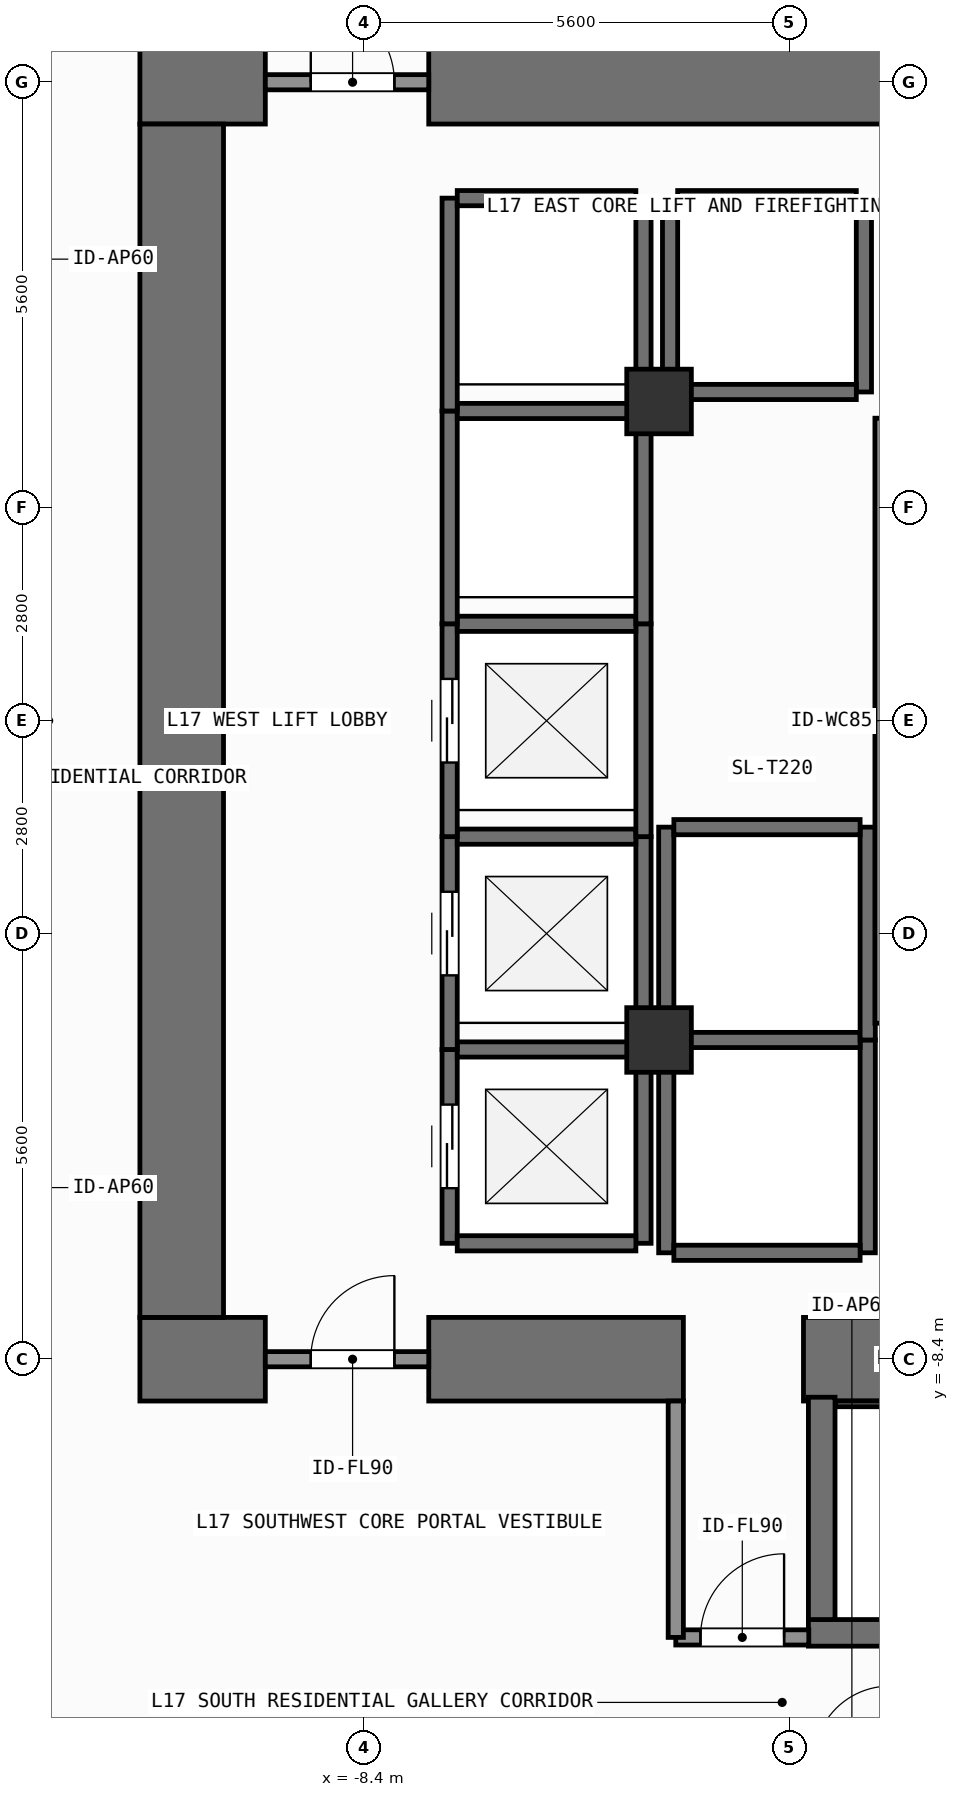
"""IFC4 building model, lengths in metres.
Left out: names, types, materials, properties, quantities, classifications, styles, units other than length and angle.
Written with IfcOpenShell. Run it as: python <this file> out.ifc"""

import sys

from ifc_helpers import new_model, si_unit, direction, frame, frame_2d, origin, origin_2d, place, context, subcontext, project, spatial, rectangle, extrude, element, fill, save


model = new_model("IFC4")
c1 = context("Model", 3, precision=1e-05, world=origin(), true_north=direction((0.0, 1.0)))
c2 = subcontext(c1, "Body", "Model", "MODEL_VIEW")
j1 = project(units=[si_unit("LENGTHUNIT", "METRE"), si_unit("PLANEANGLEUNIT", "RADIAN")], contexts=[c1])
p1 = place(None, origin())
s1 = spatial("IfcSite", under=j1, at=p1, CompositionType="ELEMENT")
p2 = place(p1, origin())
s2 = spatial("IfcBuilding", under=s1, at=p2, CompositionType="ELEMENT")
p3 = place(p2, frame((0.0, 0.0, 65.7)))
s3 = spatial("IfcBuildingStorey", under=s2, at=p3, CompositionType="ELEMENT", Elevation=65.7)
p4 = place(p3, frame((-11.35, -8.4, 0.0), z_axis=(0.0, 0.0, 1.0), x_axis=(1.0, 0.0, 0.0)))
e1 = element("IfcWall", 1, at=p4, inside=s3, PredefinedType="SHEAR", context=c2, shape_type="SweptSolid", body=[
    extrude(rectangle(XDim=1.65, YDim=1.1, at=frame_2d((0.825, 0.0))), origin(), (0.0, 0.0, 1.0), 3.9),
])
p5 = place(p3, frame((-7.55, -8.4, 0.0), z_axis=(0.0, 0.0, 1.0), x_axis=(1.0, 0.0, 0.0)))
e2 = element("IfcWall", 2, at=p5, inside=s3, PredefinedType="SHEAR", context=c2, shape_type="SweptSolid", body=[
    extrude(rectangle(XDim=3.35, YDim=1.1, at=frame_2d((1.675, 0.0))), origin(), (0.0, 0.0, 1.0), 3.9),
])
p6 = place(p3, frame((-2.62, -8.4, 0.0), z_axis=(0.0, 0.0, 1.0), x_axis=(1.0, 0.0, 0.0)))
e3 = element("IfcWall", 3, at=p6, inside=s3, PredefinedType="SHEAR", context=c2, shape_type="SweptSolid", body=[
    extrude(rectangle(XDim=7.27, YDim=1.1, at=frame_2d((3.635, 0.0))), origin(), (0.0, 0.0, 1.0), 3.9),
])
p7 = place(p3, frame((-11.35, 8.4, 0.0), z_axis=(0.0, 0.0, 1.0), x_axis=(1.0, 0.0, 0.0)))
e4 = element("IfcWall", 4, at=p7, inside=s3, PredefinedType="SHEAR", context=c2, shape_type="SweptSolid", body=[
    extrude(rectangle(XDim=1.65, YDim=1.1, at=frame_2d((0.825, 0.0))), origin(), (0.0, 0.0, 1.0), 3.9),
])
p8 = place(p3, frame((-7.55, 8.4, 0.0), z_axis=(0.0, 0.0, 1.0), x_axis=(1.0, 0.0, 0.0)))
e5 = element("IfcWall", 5, at=p8, inside=s3, PredefinedType="SHEAR", context=c2, shape_type="SweptSolid", body=[
    extrude(rectangle(XDim=16.5, YDim=1.1, at=frame_2d((8.25, 0.0))), origin(), (0.0, 0.0, 1.0), 3.9),
])
p9 = place(p3, frame((-10.8, -7.85, 0.0), z_axis=(0.0, 0.0, 1.0), x_axis=(0.0, 1.0, 0.0)))
e6 = element("IfcWall", 6, at=p9, inside=s3, PredefinedType="SHEAR", context=c2, shape_type="SweptSolid", body=[
    extrude(rectangle(XDim=15.7, YDim=1.1, at=frame_2d((7.85, 0.0))), origin(), (0.0, 0.0, 1.0), 3.9),
])
p10 = place(p3, frame((-2.555, -12.0, 0.0), z_axis=(0.0, 0.0, 1.0), x_axis=(1.0, 0.0, 0.0)))
e7 = element("IfcWall", 7, at=p10, inside=s3, PredefinedType="SHEAR", context=c2, shape_type="SweptSolid", body=[
    extrude(rectangle(XDim=7.31, YDim=0.35, at=frame_2d((3.655, 0.0))), origin(), (0.0, 0.0, 1.0), 3.9),
])
p11 = place(p3, frame((-2.2, -8.988, 0.0), z_axis=(0.0, 0.0, 1.0), x_axis=(1.0, 0.0, 0.0)))
e8 = element("IfcWall", 8, at=p11, inside=s3, PredefinedType="SHEAR", context=c2, shape_type="SweptSolid", body=[
    extrude(rectangle(XDim=6.6, YDim=0.075, at=frame_2d((3.3, 0.0))), origin(), (0.0, 0.0, 1.0), 3.9),
])
p12 = place(p3, frame((-2.38, -11.825, 0.0), z_axis=(0.0, 0.0, 1.0), x_axis=(0.0, 1.0, 0.0)))
e9 = element("IfcWall", 9, at=p12, inside=s3, PredefinedType="SHEAR", context=c2, shape_type="SweptSolid", body=[
    extrude(rectangle(XDim=2.925, YDim=0.35, at=frame_2d((1.462, 0.0))), origin(), (0.0, 0.0, 1.0), 3.9),
])
for number, where, z_axis, x_axis in (
    (10, (-4.52, -4.2, 0.0), (0.0, 0.0, 1.0), (1.0, 0.0, 0.0)),
    (11, (-4.52, 4.2, 0.0), (0.0, 0.0, 1.0), (1.0, 0.0, 0.0)),
):
    element("IfcColumn", number, at=place(p3, frame(where, z_axis=z_axis, x_axis=x_axis)), inside=s3, PredefinedType="COLUMN", context=c2, shape_type="SweptSolid", body=[
        extrude(rectangle(XDim=0.85, YDim=0.85, at=origin_2d()), origin(), (0.0, 0.0, 1.0), 3.9),
    ])
p13 = place(p3, frame((-7.275, -6.875, 0.0), z_axis=(0.0, 0.0, 1.0), x_axis=(0.0, 1.0, 0.0)))
e12 = element("IfcWall", 12, at=p13, inside=s3, PredefinedType="SHEAR", context=c2, shape_type="SweptSolid", body=[
    extrude(rectangle(XDim=2.55, YDim=0.2, at=frame_2d((1.275, 0.0))), origin(), (0.0, 0.0, 1.0), 3.68),
])
p14 = place(p13, frame((0.725, 0.0, 0.0)))
e13 = element("IfcOpeningElement", 13, at=p14, cuts=e12, PredefinedType="OPENING", context=c2, shape_type="SweptSolid", body=[
    extrude(rectangle(XDim=1.1, YDim=2.2, at=frame_2d((0.55, 1.1))), frame((0.0, 0.11, 0.0), z_axis=(0.0, -1.0, 0.0), x_axis=(1.0, 0.0, 0.0)), (0.0, 0.0, 1.0), 0.22),
])
p15 = place(p3, frame((-4.725, -6.875, 0.0), z_axis=(0.0, 0.0, 1.0), x_axis=(0.0, 1.0, 0.0)))
e14 = element("IfcWall", 14, at=p15, inside=s3, PredefinedType="SHEAR", context=c2, shape_type="SweptSolid", body=[
    extrude(rectangle(XDim=2.55, YDim=0.2, at=frame_2d((1.275, 0.0))), origin(), (0.0, 0.0, 1.0), 3.68),
])
for number, where, z_axis, x_axis in (
    (15, (-7.175, -6.875, 0.0), (0.0, 0.0, 1.0), (1.0, 0.0, 0.0)),
    (16, (-7.175, -4.325, 0.0), (0.0, 0.0, 1.0), (1.0, 0.0, 0.0)),
):
    element("IfcWall", number, at=place(p3, frame(where, z_axis=z_axis, x_axis=x_axis)), inside=s3, PredefinedType="SHEAR", context=c2, shape_type="SweptSolid", body=[
        extrude(rectangle(XDim=2.35, YDim=0.2, at=frame_2d((1.175, 0.0))), origin(), (0.0, 0.0, 1.0), 3.68),
    ])
p16 = place(p3, frame((-7.275, -4.325, 0.0), z_axis=(0.0, 0.0, 1.0), x_axis=(0.0, 1.0, 0.0)))
e17 = element("IfcWall", 17, at=p16, inside=s3, PredefinedType="SHEAR", context=c2, shape_type="SweptSolid", body=[
    extrude(rectangle(XDim=2.8, YDim=0.2, at=frame_2d((1.4, 0.0))), origin(), (0.0, 0.0, 1.0), 3.68),
])
p17 = place(p16, frame((0.975, 0.0, 0.0)))
e18 = element("IfcOpeningElement", 18, at=p17, cuts=e17, PredefinedType="OPENING", context=c2, shape_type="SweptSolid", body=[
    extrude(rectangle(XDim=1.1, YDim=2.2, at=frame_2d((0.55, 1.1))), frame((0.0, 0.11, 0.0), z_axis=(0.0, -1.0, 0.0), x_axis=(1.0, 0.0, 0.0)), (0.0, 0.0, 1.0), 0.22),
])
p18 = place(p3, frame((-4.725, -4.325, 0.0), z_axis=(0.0, 0.0, 1.0), x_axis=(0.0, 1.0, 0.0)))
e19 = element("IfcWall", 19, at=p18, inside=s3, PredefinedType="SHEAR", context=c2, shape_type="SweptSolid", body=[
    extrude(rectangle(XDim=2.8, YDim=0.2, at=frame_2d((1.4, 0.0))), origin(), (0.0, 0.0, 1.0), 3.68),
])
p19 = place(p3, frame((-7.175, -1.525, 0.0), z_axis=(0.0, 0.0, 1.0), x_axis=(1.0, 0.0, 0.0)))
e20 = element("IfcWall", 20, at=p19, inside=s3, PredefinedType="SHEAR", context=c2, shape_type="SweptSolid", body=[
    extrude(rectangle(XDim=2.35, YDim=0.2, at=frame_2d((1.175, 0.0))), origin(), (0.0, 0.0, 1.0), 3.68),
])
p20 = place(p3, frame((-7.275, -1.525, 0.0), z_axis=(0.0, 0.0, 1.0), x_axis=(0.0, 1.0, 0.0)))
e21 = element("IfcWall", 21, at=p20, inside=s3, PredefinedType="SHEAR", context=c2, shape_type="SweptSolid", body=[
    extrude(rectangle(XDim=2.8, YDim=0.2, at=frame_2d((1.4, 0.0))), origin(), (0.0, 0.0, 1.0), 3.68),
])
p21 = place(p20, frame((0.975, 0.0, 0.0)))
e22 = element("IfcOpeningElement", 22, at=p21, cuts=e21, PredefinedType="OPENING", context=c2, shape_type="SweptSolid", body=[
    extrude(rectangle(XDim=1.1, YDim=2.2, at=frame_2d((0.55, 1.1))), frame((0.0, 0.11, 0.0), z_axis=(0.0, -1.0, 0.0), x_axis=(1.0, 0.0, 0.0)), (0.0, 0.0, 1.0), 0.22),
])
p22 = place(p3, frame((-4.725, -1.525, 0.0), z_axis=(0.0, 0.0, 1.0), x_axis=(0.0, 1.0, 0.0)))
e23 = element("IfcWall", 23, at=p22, inside=s3, PredefinedType="SHEAR", context=c2, shape_type="SweptSolid", body=[
    extrude(rectangle(XDim=2.8, YDim=0.2, at=frame_2d((1.4, 0.0))), origin(), (0.0, 0.0, 1.0), 3.68),
])
p23 = place(p3, frame((-7.175, 1.275, 0.0), z_axis=(0.0, 0.0, 1.0), x_axis=(1.0, 0.0, 0.0)))
e24 = element("IfcWall", 24, at=p23, inside=s3, PredefinedType="SHEAR", context=c2, shape_type="SweptSolid", body=[
    extrude(rectangle(XDim=2.35, YDim=0.2, at=frame_2d((1.175, 0.0))), origin(), (0.0, 0.0, 1.0), 3.68),
])
for number, where, z_axis, x_axis in (
    (25, (-7.275, 1.275, 0.0), (0.0, 0.0, 1.0), (0.0, 1.0, 0.0)),
    (26, (-4.725, 1.275, 0.0), (0.0, 0.0, 1.0), (0.0, 1.0, 0.0)),
):
    element("IfcWall", number, at=place(p3, frame(where, z_axis=z_axis, x_axis=x_axis)), inside=s3, PredefinedType="SHEAR", context=c2, shape_type="SweptSolid", body=[
        extrude(rectangle(XDim=2.8, YDim=0.2, at=frame_2d((1.4, 0.0))), origin(), (0.0, 0.0, 1.0), 3.68),
    ])
p24 = place(p3, frame((-7.175, 4.075, 0.0), z_axis=(0.0, 0.0, 1.0), x_axis=(1.0, 0.0, 0.0)))
e27 = element("IfcWall", 27, at=p24, inside=s3, PredefinedType="SHEAR", context=c2, shape_type="SweptSolid", body=[
    extrude(rectangle(XDim=2.35, YDim=0.2, at=frame_2d((1.175, 0.0))), origin(), (0.0, 0.0, 1.0), 3.68),
])
for number, where, z_axis, x_axis in (
    (28, (-7.275, 4.075, 0.0), (0.0, 0.0, 1.0), (0.0, 1.0, 0.0)),
    (29, (-4.725, 4.075, 0.0), (0.0, 0.0, 1.0), (0.0, 1.0, 0.0)),
):
    element("IfcWall", number, at=place(p3, frame(where, z_axis=z_axis, x_axis=x_axis)), inside=s3, PredefinedType="SHEAR", context=c2, shape_type="SweptSolid", body=[
        extrude(rectangle(XDim=2.8, YDim=0.2, at=frame_2d((1.4, 0.0))), origin(), (0.0, 0.0, 1.0), 3.68),
    ])
p25 = place(p3, frame((-7.175, 6.875, 0.0), z_axis=(0.0, 0.0, 1.0), x_axis=(1.0, 0.0, 0.0)))
e30 = element("IfcWall", 30, at=p25, inside=s3, PredefinedType="SHEAR", context=c2, shape_type="SweptSolid", body=[
    extrude(rectangle(XDim=2.35, YDim=0.2, at=frame_2d((1.175, 0.0))), origin(), (0.0, 0.0, 1.0), 3.68),
])
for number, where, z_axis, x_axis in (
    (31, (-4.375, 4.325, 0.0), (0.0, 0.0, 1.0), (0.0, 1.0, 0.0)),
    (32, (-1.825, 4.325, 0.0), (0.0, 0.0, 1.0), (0.0, 1.0, 0.0)),
):
    element("IfcWall", number, at=place(p3, frame(where, z_axis=z_axis, x_axis=x_axis)), inside=s3, PredefinedType="SHEAR", context=c2, shape_type="SweptSolid", body=[
        extrude(rectangle(XDim=2.55, YDim=0.2, at=frame_2d((1.275, 0.0))), origin(), (0.0, 0.0, 1.0), 3.68),
    ])
for number, where, z_axis, x_axis in (
    (33, (-4.275, 4.325, 0.0), (0.0, 0.0, 1.0), (1.0, 0.0, 0.0)),
    (34, (-4.275, 6.875, 0.0), (0.0, 0.0, 1.0), (1.0, 0.0, 0.0)),
):
    element("IfcWall", number, at=place(p3, frame(where, z_axis=z_axis, x_axis=x_axis)), inside=s3, PredefinedType="SHEAR", context=c2, shape_type="SweptSolid", body=[
        extrude(rectangle(XDim=2.35, YDim=0.2, at=frame_2d((1.175, 0.0))), origin(), (0.0, 0.0, 1.0), 3.68),
    ])
for number, where, z_axis, x_axis in (
    (35, (-4.425, -7.0, 0.0), (0.0, 0.0, 1.0), (0.0, 1.0, 0.0)),
    (36, (-1.775, -7.0, 0.0), (0.0, 0.0, 1.0), (0.0, 1.0, 0.0)),
):
    element("IfcWall", number, at=place(p3, frame(where, z_axis=z_axis, x_axis=x_axis)), inside=s3, PredefinedType="SHEAR", context=c2, shape_type="SweptSolid", body=[
        extrude(rectangle(XDim=2.8, YDim=0.2, at=frame_2d((1.4, 0.0))), origin(), (0.0, 0.0, 1.0), 3.68),
    ])
for number, where, z_axis, x_axis in (
    (37, (-4.325, -7.0, 0.0), (0.0, 0.0, 1.0), (1.0, 0.0, 0.0)),
    (38, (-4.325, -4.2, 0.0), (0.0, 0.0, 1.0), (1.0, 0.0, 0.0)),
):
    element("IfcWall", number, at=place(p3, frame(where, z_axis=z_axis, x_axis=x_axis)), inside=s3, PredefinedType="SHEAR", context=c2, shape_type="SweptSolid", body=[
        extrude(rectangle(XDim=2.45, YDim=0.2, at=frame_2d((1.225, 0.0))), origin(), (0.0, 0.0, 1.0), 3.68),
    ])
for number, where, z_axis, x_axis in (
    (39, (-4.425, -4.2, 0.0), (0.0, 0.0, 1.0), (0.0, 1.0, 0.0)),
    (40, (-1.775, -4.2, 0.0), (0.0, 0.0, 1.0), (0.0, 1.0, 0.0)),
):
    element("IfcWall", number, at=place(p3, frame(where, z_axis=z_axis, x_axis=x_axis)), inside=s3, PredefinedType="SHEAR", context=c2, shape_type="SweptSolid", body=[
        extrude(rectangle(XDim=2.8, YDim=0.2, at=frame_2d((1.4, 0.0))), origin(), (0.0, 0.0, 1.0), 3.68),
    ])
p26 = place(p3, frame((-4.325, -1.4, 0.0), z_axis=(0.0, 0.0, 1.0), x_axis=(1.0, 0.0, 0.0)))
e41 = element("IfcWall", 41, at=p26, inside=s3, PredefinedType="SHEAR", context=c2, shape_type="SweptSolid", body=[
    extrude(rectangle(XDim=2.45, YDim=0.2, at=frame_2d((1.225, 0.0))), origin(), (0.0, 0.0, 1.0), 3.68),
])
p27 = place(p3, frame((-9.7, -8.4, 0.0), z_axis=(0.0, 0.0, 1.0), x_axis=(1.0, 0.0, 0.0)))
e42 = element("IfcWall", 42, at=p27, inside=s3, PredefinedType="SOLIDWALL", context=c2, shape_type="SweptSolid", body=[
    extrude(rectangle(XDim=2.15, YDim=0.2, at=frame_2d((1.075, 0.0))), origin(), (0.0, 0.0, 1.0), 2.72),
])
p28 = place(p27, frame((0.598, 0.0, 0.0)))
e43 = element("IfcOpeningElement", 43, at=p28, cuts=e42, PredefinedType="OPENING", context=c2, shape_type="SweptSolid", body=[
    extrude(rectangle(XDim=1.1, YDim=2.15, at=frame_2d((0.55, 1.075))), frame((0.0, 0.11, 0.0), z_axis=(0.0, -1.0, 0.0), x_axis=(1.0, 0.0, 0.0)), (0.0, 0.0, 1.0), 0.22),
])
p29 = place(p3, frame((-9.7, 8.4, 0.0), z_axis=(0.0, 0.0, 1.0), x_axis=(1.0, 0.0, 0.0)))
e44 = element("IfcWall", 44, at=p29, inside=s3, PredefinedType="SOLIDWALL", context=c2, shape_type="SweptSolid", body=[
    extrude(rectangle(XDim=2.15, YDim=0.2, at=frame_2d((1.075, 0.0))), origin(), (0.0, 0.0, 1.0), 2.72),
])
p30 = place(p29, frame((0.598, 0.0, 0.0)))
e45 = element("IfcOpeningElement", 45, at=p30, cuts=e44, PredefinedType="OPENING", context=c2, shape_type="SweptSolid", body=[
    extrude(rectangle(XDim=1.1, YDim=2.15, at=frame_2d((0.55, 1.075))), frame((0.0, 0.11, 0.0), z_axis=(0.0, -1.0, 0.0), x_axis=(1.0, 0.0, 0.0)), (0.0, 0.0, 1.0), 0.22),
])
p31 = place(p3, frame((-4.3, -12.06, 0.0), z_axis=(0.0, 0.0, 1.0), x_axis=(1.0, 0.0, 0.0)))
e46 = element("IfcWall", 46, at=p31, inside=s3, PredefinedType="SOLIDWALL", context=c2, shape_type="SweptSolid", body=[
    extrude(rectangle(XDim=1.75, YDim=0.2, at=frame_2d((0.875, 0.0))), origin(), (0.0, 0.0, 1.0), 3.68),
])
p32 = place(p31, frame((0.325, 0.0, 0.0)))
e47 = element("IfcOpeningElement", 47, at=p32, cuts=e46, PredefinedType="OPENING", context=c2, shape_type="SweptSolid", body=[
    extrude(rectangle(XDim=1.1, YDim=2.15, at=frame_2d((0.55, 1.075))), frame((0.0, 0.11, 0.0), z_axis=(0.0, -1.0, 0.0), x_axis=(1.0, 0.0, 0.0)), (0.0, 0.0, 1.0), 0.22),
])
p33 = place(p3, frame((-4.3, -12.06, 0.0), z_axis=(0.0, 0.0, 1.0), x_axis=(0.0, 1.0, 0.0)))
e48 = element("IfcWall", 48, at=p33, inside=s3, PredefinedType="SOLIDWALL", context=c2, shape_type="SweptSolid", body=[
    extrude(rectangle(XDim=3.11, YDim=0.2, at=frame_2d((1.555, 0.0))), origin(), (0.0, 0.0, 1.0), 3.68),
])
p34 = place(p3, frame((-1.58, -3.98, 0.0), z_axis=(0.0, 0.0, 1.0), x_axis=(0.0, 1.0, 0.0)))
e49 = element("IfcWall", 49, at=p34, inside=s3, PredefinedType="SOLIDWALL", context=c2, shape_type="SweptSolid", body=[
    extrude(rectangle(XDim=7.96, YDim=0.2, at=frame_2d((3.98, 0.0))), origin(), (0.0, 0.0, 1.0), 3.68),
])
p35 = place(p14, origin())
e50 = element("IfcDoor", 50, at=p35, inside=s3, OperationType="SLIDING_TO_LEFT", PredefinedType="DOOR", context=c2, shape_type="SweptSolid", body=[
    extrude(rectangle(XDim=1.1, YDim=2.2, at=frame_2d((0.55, 1.1))), frame((0.0, 0.025, 0.0), z_axis=(0.0, -1.0, 0.0), x_axis=(1.0, 0.0, 0.0)), (0.0, 0.0, 1.0), 0.05),
])
fill(e13, e50)
p36 = place(p17, origin())
e51 = element("IfcDoor", 51, at=p36, inside=s3, OperationType="SLIDING_TO_LEFT", PredefinedType="DOOR", context=c2, shape_type="SweptSolid", body=[
    extrude(rectangle(XDim=1.1, YDim=2.2, at=frame_2d((0.55, 1.1))), frame((0.0, 0.025, 0.0), z_axis=(0.0, -1.0, 0.0), x_axis=(1.0, 0.0, 0.0)), (0.0, 0.0, 1.0), 0.05),
])
fill(e18, e51)
p37 = place(p21, origin())
e52 = element("IfcDoor", 52, at=p37, inside=s3, OperationType="SLIDING_TO_LEFT", PredefinedType="DOOR", context=c2, shape_type="SweptSolid", body=[
    extrude(rectangle(XDim=1.1, YDim=2.2, at=frame_2d((0.55, 1.1))), frame((0.0, 0.025, 0.0), z_axis=(0.0, -1.0, 0.0), x_axis=(1.0, 0.0, 0.0)), (0.0, 0.0, 1.0), 0.05),
])
fill(e22, e52)
p38 = place(p28, origin())
e53 = element("IfcDoor", 53, at=p38, inside=s3, OperationType="SINGLE_SWING_RIGHT", PredefinedType="DOOR", context=c2, shape_type="SweptSolid", body=[
    extrude(rectangle(XDim=1.1, YDim=2.15, at=frame_2d((0.55, 1.075))), frame((0.0, 0.025, 0.0), z_axis=(0.0, -1.0, 0.0), x_axis=(1.0, 0.0, 0.0)), (0.0, 0.0, 1.0), 0.05),
])
fill(e43, e53)
p39 = place(p30, origin())
e54 = element("IfcDoor", 54, at=p39, inside=s3, OperationType="SINGLE_SWING_LEFT", PredefinedType="DOOR", context=c2, shape_type="SweptSolid", body=[
    extrude(rectangle(XDim=1.1, YDim=2.15, at=frame_2d((0.55, 1.075))), frame((0.0, 0.025, 0.0), z_axis=(0.0, -1.0, 0.0), x_axis=(1.0, 0.0, 0.0)), (0.0, 0.0, 1.0), 0.05),
])
fill(e45, e54)
p40 = place(p32, origin())
e55 = element("IfcDoor", 55, at=p40, inside=s3, OperationType="SINGLE_SWING_RIGHT", PredefinedType="DOOR", context=c2, shape_type="SweptSolid", body=[
    extrude(rectangle(XDim=1.1, YDim=2.15, at=frame_2d((0.55, 1.075))), frame((0.0, 0.025, 0.0), z_axis=(0.0, -1.0, 0.0), x_axis=(1.0, 0.0, 0.0)), (0.0, 0.0, 1.0), 0.05),
])
fill(e47, e55)
save(model, sys.argv[1])
